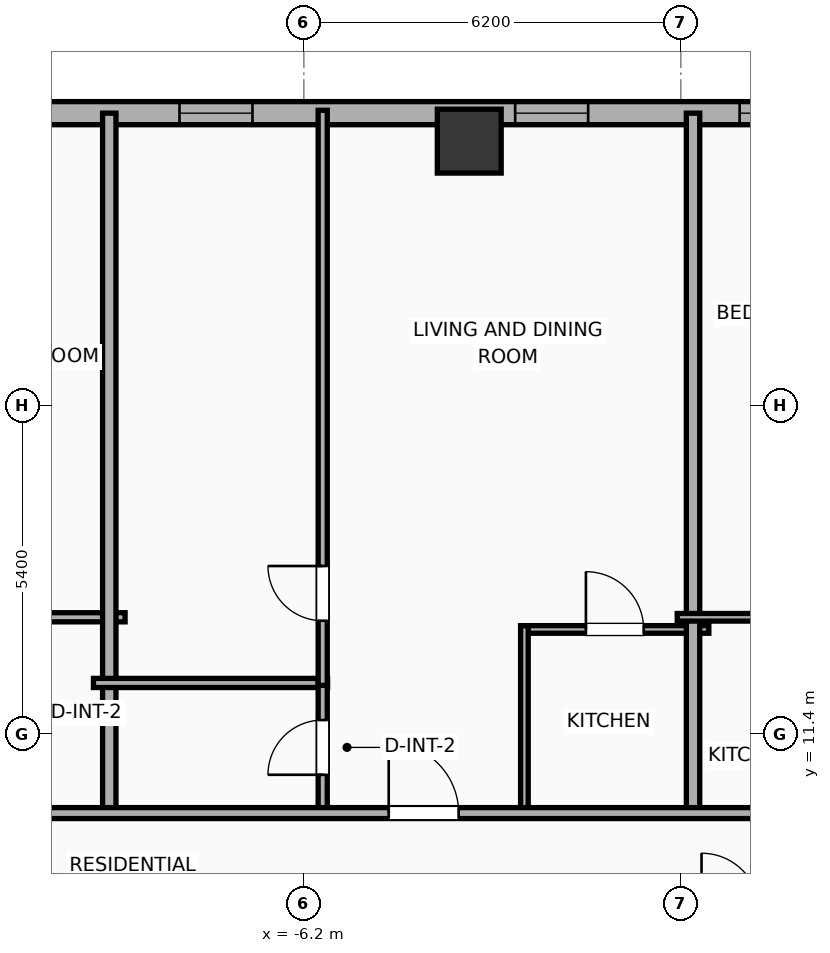
"""IFC4 building model, lengths in metres.
Left out: names, types, materials, properties, quantities, classifications, styles, units other than length and angle.
Written with IfcOpenShell. Run it as: python <this file> out.ifc"""

import sys

from ifc_helpers import new_model, si_unit, direction, frame, frame_2d, origin, origin_2d, place, context, subcontext, project, spatial, rectangle, hollow_rectangle, extrude, element, fill, save


model = new_model("IFC4")
c1 = context("Model", 3, precision=1e-05, world=origin(), true_north=direction((0.0, 1.0)))
c2 = subcontext(c1, "Body", "Model", "MODEL_VIEW")
j1 = project(units=[si_unit("LENGTHUNIT", "METRE"), si_unit("PLANEANGLEUNIT", "RADIAN")], contexts=[c1])
p1 = place(None, origin())
s1 = spatial("IfcSite", under=j1, at=p1, CompositionType="ELEMENT")
p2 = place(p1, origin())
s2 = spatial("IfcBuilding", under=s1, at=p2, CompositionType="ELEMENT")
p3 = place(p2, frame((0.0, 0.0, 97.5)))
s3 = spatial("IfcBuildingStorey", under=s2, at=p3, CompositionType="ELEMENT", Elevation=97.5)
p4 = place(p3, frame((-3.48, 21.15, 0.0), z_axis=(0.0, 0.0, 1.0), x_axis=(1.0, 0.0, 0.0)))
e1 = element("IfcColumn", 1, at=p4, inside=s3, PredefinedType="COLUMN", context=c2, shape_type="SweptSolid", body=[
    extrude(hollow_rectangle(XDim=1.05, YDim=1.05, WallThickness=0.036, at=origin_2d()), origin(), (0.0, 0.0, 1.0), 3.9),
])
p5 = place(p3, frame((-25.381, 21.61, 0.0), z_axis=(0.0, 0.0, 1.0), x_axis=(1.0, 0.0, 0.0)))
e2 = element("IfcWall", 2, at=p5, inside=s3, PredefinedType="ELEMENTEDWALL", context=c2, shape_type="SweptSolid", body=[
    extrude(rectangle(XDim=54.763, YDim=0.38, at=frame_2d((27.381, 0.0))), origin(), (0.0, 0.0, 1.0), 3.65),
])
p6 = place(p5, frame((45.067, 0.0, 0.75)))
e3 = element("IfcOpeningElement", 3, at=p6, cuts=e2, PredefinedType="OPENING", context=c2, shape_type="SweptSolid", body=[
    extrude(rectangle(XDim=2.4, YDim=2.1, at=frame_2d((1.2, 1.05))), frame((0.0, 0.2, 0.0), z_axis=(0.0, -1.0, 0.0), x_axis=(1.0, 0.0, 0.0)), (0.0, 0.0, 1.0), 0.4),
])
p7 = place(p5, frame((4.076, 0.0, 0.75)))
e4 = element("IfcOpeningElement", 4, at=p7, cuts=e2, PredefinedType="OPENING", context=c2, shape_type="SweptSolid", body=[
    extrude(rectangle(XDim=1.2, YDim=2.05, at=frame_2d((0.6, 1.025))), frame((0.0, 0.2, 0.0), z_axis=(0.0, -1.0, 0.0), x_axis=(1.0, 0.0, 0.0)), (0.0, 0.0, 1.0), 0.4),
])
p8 = place(p5, frame((9.395, 0.0, 0.75)))
e5 = element("IfcOpeningElement", 5, at=p8, cuts=e2, PredefinedType="OPENING", context=c2, shape_type="SweptSolid", body=[
    extrude(rectangle(XDim=0.85, YDim=2.05, at=frame_2d((0.425, 1.025))), frame((0.0, 0.2, 0.0), z_axis=(0.0, -1.0, 0.0), x_axis=(1.0, 0.0, 0.0)), (0.0, 0.0, 1.0), 0.4),
])
p9 = place(p5, frame((7.205, 0.0, 0.75)))
e6 = element("IfcOpeningElement", 6, at=p9, cuts=e2, PredefinedType="OPENING", context=c2, shape_type="SweptSolid", body=[
    extrude(rectangle(XDim=1.2, YDim=2.05, at=frame_2d((0.6, 1.025))), frame((0.0, 0.2, 0.0), z_axis=(0.0, -1.0, 0.0), x_axis=(1.0, 0.0, 0.0)), (0.0, 0.0, 1.0), 0.4),
])
p10 = place(p5, frame((13.676, 0.0, 0.75)))
e7 = element("IfcOpeningElement", 7, at=p10, cuts=e2, PredefinedType="OPENING", context=c2, shape_type="SweptSolid", body=[
    extrude(rectangle(XDim=1.2, YDim=2.05, at=frame_2d((0.6, 1.025))), frame((0.0, 0.2, 0.0), z_axis=(0.0, -1.0, 0.0), x_axis=(1.0, 0.0, 0.0)), (0.0, 0.0, 1.0), 0.4),
])
p11 = place(p5, frame((17.136, 0.0, 0.75)))
e8 = element("IfcOpeningElement", 8, at=p11, cuts=e2, PredefinedType="OPENING", context=c2, shape_type="SweptSolid", body=[
    extrude(rectangle(XDim=1.2, YDim=2.05, at=frame_2d((0.6, 1.025))), frame((0.0, 0.2, 0.0), z_axis=(0.0, -1.0, 0.0), x_axis=(1.0, 0.0, 0.0)), (0.0, 0.0, 1.0), 0.4),
])
p12 = place(p5, frame((22.656, 0.0, 0.75)))
e9 = element("IfcOpeningElement", 9, at=p12, cuts=e2, PredefinedType="OPENING", context=c2, shape_type="SweptSolid", body=[
    extrude(rectangle(XDim=1.2, YDim=2.05, at=frame_2d((0.6, 1.025))), frame((0.0, 0.2, 0.0), z_axis=(0.0, -1.0, 0.0), x_axis=(1.0, 0.0, 0.0)), (0.0, 0.0, 1.0), 0.4),
])
p13 = place(p5, frame((29.443, 0.0, 0.75)))
e10 = element("IfcOpeningElement", 10, at=p13, cuts=e2, PredefinedType="OPENING", context=c2, shape_type="SweptSolid", body=[
    extrude(rectangle(XDim=1.2, YDim=2.05, at=frame_2d((0.6, 1.025))), frame((0.0, 0.2, 0.0), z_axis=(0.0, -1.0, 0.0), x_axis=(1.0, 0.0, 0.0)), (0.0, 0.0, 1.0), 0.4),
])
p14 = place(p5, frame((26.348, 0.0, 0.75)))
e11 = element("IfcOpeningElement", 11, at=p14, cuts=e2, PredefinedType="OPENING", context=c2, shape_type="SweptSolid", body=[
    extrude(rectangle(XDim=1.2, YDim=2.05, at=frame_2d((0.6, 1.025))), frame((0.0, 0.2, 0.0), z_axis=(0.0, -1.0, 0.0), x_axis=(1.0, 0.0, 0.0)), (0.0, 0.0, 1.0), 0.4),
])
p15 = place(p5, frame((33.596, 0.0, 0.75)))
e12 = element("IfcOpeningElement", 12, at=p15, cuts=e2, PredefinedType="OPENING", context=c2, shape_type="SweptSolid", body=[
    extrude(rectangle(XDim=1.2, YDim=2.05, at=frame_2d((0.6, 1.025))), frame((0.0, 0.2, 0.0), z_axis=(0.0, -1.0, 0.0), x_axis=(1.0, 0.0, 0.0)), (0.0, 0.0, 1.0), 0.4),
])
p16 = place(p5, frame((36.014, 0.0, 0.75)))
e13 = element("IfcOpeningElement", 13, at=p16, cuts=e2, PredefinedType="OPENING", context=c2, shape_type="SweptSolid", body=[
    extrude(rectangle(XDim=1.2, YDim=2.05, at=frame_2d((0.6, 1.025))), frame((0.0, 0.2, 0.0), z_axis=(0.0, -1.0, 0.0), x_axis=(1.0, 0.0, 0.0)), (0.0, 0.0, 1.0), 0.4),
])
p17 = place(p5, frame((40.814, 0.0, 0.75)))
e14 = element("IfcOpeningElement", 14, at=p17, cuts=e2, PredefinedType="OPENING", context=c2, shape_type="SweptSolid", body=[
    extrude(rectangle(XDim=1.2, YDim=2.05, at=frame_2d((0.6, 1.025))), frame((0.0, 0.2, 0.0), z_axis=(0.0, -1.0, 0.0), x_axis=(1.0, 0.0, 0.0)), (0.0, 0.0, 1.0), 0.4),
])
p18 = place(p5, frame((49.385, 0.0, 0.75)))
e15 = element("IfcOpeningElement", 15, at=p18, cuts=e2, PredefinedType="OPENING", context=c2, shape_type="SweptSolid", body=[
    extrude(rectangle(XDim=1.2, YDim=2.05, at=frame_2d((0.6, 1.025))), frame((0.0, 0.2, 0.0), z_axis=(0.0, -1.0, 0.0), x_axis=(1.0, 0.0, 0.0)), (0.0, 0.0, 1.0), 0.4),
])
p19 = place(p5, frame((52.181, 0.0, 0.75)))
e16 = element("IfcOpeningElement", 16, at=p19, cuts=e2, PredefinedType="OPENING", context=c2, shape_type="SweptSolid", body=[
    extrude(rectangle(XDim=1.2, YDim=2.05, at=frame_2d((0.6, 1.025))), frame((0.0, 0.2, 0.0), z_axis=(0.0, -1.0, 0.0), x_axis=(1.0, 0.0, 0.0)), (0.0, 0.0, 1.0), 0.4),
])
p20 = place(p3, frame((-12.93, 13.32, 0.0), z_axis=(0.0, 0.0, 1.0), x_axis=(1.0, 0.0, 0.0)))
e17 = element("IfcWall", 17, at=p20, inside=s3, PredefinedType="PLUMBINGWALL", context=c2, shape_type="SweptSolid", body=[
    extrude(rectangle(XDim=3.79, YDim=0.15, at=frame_2d((1.895, 0.0))), origin(), (0.0, 0.0, 1.0), 3.65),
])
p21 = place(p3, frame((-9.4, 10.02, 0.0), z_axis=(0.0, 0.0, 1.0), x_axis=(0.0, 1.0, 0.0)))
e18 = element("IfcWall", 18, at=p21, inside=s3, PredefinedType="PARTITIONING", context=c2, shape_type="SweptSolid", body=[
    extrude(rectangle(XDim=11.59, YDim=0.22, at=frame_2d((5.795, 0.0))), origin(), (0.0, 0.0, 1.0), 3.65),
])
p22 = place(p3, frame((-9.66, 12.24, 0.0), z_axis=(0.0, 0.0, 1.0), x_axis=(1.0, 0.0, 0.0)))
e19 = element("IfcWall", 19, at=p22, inside=s3, PredefinedType="PLUMBINGWALL", context=c2, shape_type="SweptSolid", body=[
    extrude(rectangle(XDim=3.85, YDim=0.15, at=frame_2d((1.925, 0.0))), origin(), (0.0, 0.0, 1.0), 3.65),
])
p23 = place(p3, frame((-5.89, 10.08, 0.0), z_axis=(0.0, 0.0, 1.0), x_axis=(0.0, 1.0, 0.0)))
e20 = element("IfcWall", 20, at=p23, inside=s3, PredefinedType="PLUMBINGWALL", context=c2, shape_type="SweptSolid", body=[
    extrude(rectangle(XDim=2.2, YDim=0.15, at=frame_2d((1.1, 0.0))), origin(), (0.0, 0.0, 1.0), 3.65),
])
p24 = place(p23, frame((0.65, 0.0, 0.0)))
e21 = element("IfcOpeningElement", 21, at=p24, cuts=e20, PredefinedType="OPENING", context=c2, shape_type="SweptSolid", body=[
    extrude(rectangle(XDim=0.9, YDim=2.05, at=frame_2d((0.45, 1.025))), frame((0.0, 0.085, 0.0), z_axis=(0.0, -1.0, 0.0), x_axis=(1.0, 0.0, 0.0)), (0.0, 0.0, 1.0), 0.17),
])
p25 = place(p3, frame((-5.89, 12.2, 0.0), z_axis=(0.0, 0.0, 1.0), x_axis=(0.0, 1.0, 0.0)))
e22 = element("IfcWall", 22, at=p25, inside=s3, PredefinedType="PLUMBINGWALL", context=c2, shape_type="SweptSolid", body=[
    extrude(rectangle(XDim=9.458, YDim=0.15, at=frame_2d((4.729, 0.0))), origin(), (0.0, 0.0, 1.0), 3.65),
])
p26 = place(p25, frame((1.063, 0.0, 0.0)))
e23 = element("IfcOpeningElement", 23, at=p26, cuts=e22, PredefinedType="OPENING", context=c2, shape_type="SweptSolid", body=[
    extrude(rectangle(XDim=0.9, YDim=2.05, at=frame_2d((0.45, 1.025))), frame((0.0, 0.085, 0.0), z_axis=(0.0, -1.0, 0.0), x_axis=(1.0, 0.0, 0.0)), (0.0, 0.0, 1.0), 0.17),
])
p27 = place(p3, frame((-2.633, 13.12, 0.0), z_axis=(0.0, 0.0, 1.0), x_axis=(1.0, 0.0, 0.0)))
e24 = element("IfcWall", 24, at=p27, inside=s3, PredefinedType="PARTITIONING", context=c2, shape_type="SweptSolid", body=[
    extrude(rectangle(XDim=3.093, YDim=0.125, at=frame_2d((1.546, 0.0))), origin(), (0.0, 0.0, 1.0), 3.65),
])
p28 = place(p27, frame((1.072, 0.0, 0.0)))
e25 = element("IfcOpeningElement", 25, at=p28, cuts=e24, PredefinedType="OPENING", context=c2, shape_type="SweptSolid", body=[
    extrude(rectangle(XDim=0.95, YDim=2.05, at=frame_2d((0.475, 1.025))), frame((0.0, 0.073, 0.0), z_axis=(0.0, -1.0, 0.0), x_axis=(1.0, 0.0, 0.0)), (0.0, 0.0, 1.0), 0.145),
])
p29 = place(p3, frame((-2.573, 10.08, 0.0), z_axis=(0.0, 0.0, 1.0), x_axis=(0.0, 1.0, 0.0)))
e26 = element("IfcWall", 26, at=p29, inside=s3, PredefinedType="PARTITIONING", context=c2, shape_type="SweptSolid", body=[
    extrude(rectangle(XDim=3.1, YDim=0.125, at=frame_2d((1.55, 0.0))), origin(), (0.0, 0.0, 1.0), 3.65),
])
p30 = place(p3, frame((0.2, 10.02, 0.0), z_axis=(0.0, 0.0, 1.0), x_axis=(0.0, 1.0, 0.0)))
e27 = element("IfcWall", 27, at=p30, inside=s3, PredefinedType="PARTITIONING", context=c2, shape_type="SweptSolid", body=[
    extrude(rectangle(XDim=11.59, YDim=0.22, at=frame_2d((5.795, 0.0))), origin(), (0.0, 0.0, 1.0), 3.65),
])
p31 = place(p3, frame((-0.06, 13.32, 0.0), z_axis=(0.0, 0.0, 1.0), x_axis=(1.0, 0.0, 0.0)))
e28 = element("IfcWall", 28, at=p31, inside=s3, PredefinedType="PARTITIONING", context=c2, shape_type="SweptSolid", body=[
    extrude(rectangle(XDim=3.113, YDim=0.125, at=frame_2d((1.557, 0.0))), origin(), (0.0, 0.0, 1.0), 3.65),
])
p32 = place(p3, frame((-29.21, 10.1, 0.0), z_axis=(0.0, 0.0, 1.0), x_axis=(1.0, 0.0, 0.0)))
e29 = element("IfcWall", 29, at=p32, inside=s3, PredefinedType="PARTITIONING", context=c2, shape_type="SweptSolid", body=[
    extrude(rectangle(XDim=62.42, YDim=0.18, at=frame_2d((31.21, 0.0))), origin(), (0.0, 0.0, 1.0), 3.65),
])
p33 = place(p32, frame((4.906, 0.0, 0.0)))
e30 = element("IfcOpeningElement", 30, at=p33, cuts=e29, PredefinedType="OPENING", context=c2, shape_type="SweptSolid", body=[
    extrude(rectangle(XDim=1.15, YDim=2.05, at=frame_2d((0.575, 1.025))), frame((0.0, 0.1, 0.0), z_axis=(0.0, -1.0, 0.0), x_axis=(1.0, 0.0, 0.0)), (0.0, 0.0, 1.0), 0.2),
])
p34 = place(p32, frame((14.812, 0.0, 0.0)))
e31 = element("IfcOpeningElement", 31, at=p34, cuts=e29, PredefinedType="OPENING", context=c2, shape_type="SweptSolid", body=[
    extrude(rectangle(XDim=1.15, YDim=2.05, at=frame_2d((0.575, 1.025))), frame((0.0, 0.1, 0.0), z_axis=(0.0, -1.0, 0.0), x_axis=(1.0, 0.0, 0.0)), (0.0, 0.0, 1.0), 0.2),
])
p35 = place(p32, frame((24.406, 0.0, 0.0)))
e32 = element("IfcOpeningElement", 32, at=p35, cuts=e29, PredefinedType="OPENING", context=c2, shape_type="SweptSolid", body=[
    extrude(rectangle(XDim=1.15, YDim=2.05, at=frame_2d((0.575, 1.025))), frame((0.0, 0.1, 0.0), z_axis=(0.0, -1.0, 0.0), x_axis=(1.0, 0.0, 0.0)), (0.0, 0.0, 1.0), 0.2),
])
p36 = place(p32, frame((33.981, 0.0, 0.0)))
e33 = element("IfcOpeningElement", 33, at=p36, cuts=e29, PredefinedType="OPENING", context=c2, shape_type="SweptSolid", body=[
    extrude(rectangle(XDim=1.15, YDim=2.05, at=frame_2d((0.575, 1.025))), frame((0.0, 0.1, 0.0), z_axis=(0.0, -1.0, 0.0), x_axis=(1.0, 0.0, 0.0)), (0.0, 0.0, 1.0), 0.2),
])
p37 = place(p32, frame((43.138, 0.0, 0.0)))
e34 = element("IfcOpeningElement", 34, at=p37, cuts=e29, PredefinedType="OPENING", context=c2, shape_type="SweptSolid", body=[
    extrude(rectangle(XDim=1.15, YDim=2.05, at=frame_2d((0.575, 1.025))), frame((0.0, 0.1, 0.0), z_axis=(0.0, -1.0, 0.0), x_axis=(1.0, 0.0, 0.0)), (0.0, 0.0, 1.0), 0.2),
])
p38 = place(p32, frame((51.777, 0.0, 0.0)))
e35 = element("IfcOpeningElement", 35, at=p38, cuts=e29, PredefinedType="OPENING", context=c2, shape_type="SweptSolid", body=[
    extrude(rectangle(XDim=0.9, YDim=2.05, at=frame_2d((0.45, 1.025))), frame((0.0, 0.1, 0.0), z_axis=(0.0, -1.0, 0.0), x_axis=(1.0, 0.0, 0.0)), (0.0, 0.0, 1.0), 0.2),
])
p39 = place(p32, frame((58.718, 0.0, 0.0)))
e36 = element("IfcOpeningElement", 36, at=p39, cuts=e29, PredefinedType="OPENING", context=c2, shape_type="SweptSolid", body=[
    extrude(rectangle(XDim=0.9, YDim=2.05, at=frame_2d((0.45, 1.025))), frame((0.0, 0.1, 0.0), z_axis=(0.0, -1.0, 0.0), x_axis=(1.0, 0.0, 0.0)), (0.0, 0.0, 1.0), 0.2),
])
p40 = place(p11, origin())
e37 = element("IfcWindow", 37, at=p40, inside=s3, PartitioningType="SINGLE_PANEL", PredefinedType="WINDOW", context=c2, shape_type="SweptSolid", body=[
    extrude(rectangle(XDim=1.2, YDim=2.05, at=frame_2d((0.6, 1.025))), frame((0.0, 0.03, 0.0), z_axis=(0.0, -1.0, 0.0), x_axis=(1.0, 0.0, 0.0)), (0.0, 0.0, 1.0), 0.06),
])
fill(e8, e37)
p41 = place(p12, origin())
e38 = element("IfcWindow", 38, at=p41, inside=s3, PartitioningType="SINGLE_PANEL", PredefinedType="WINDOW", context=c2, shape_type="SweptSolid", body=[
    extrude(rectangle(XDim=1.2, YDim=2.05, at=frame_2d((0.6, 1.025))), frame((0.0, 0.03, 0.0), z_axis=(0.0, -1.0, 0.0), x_axis=(1.0, 0.0, 0.0)), (0.0, 0.0, 1.0), 0.06),
])
fill(e9, e38)
p42 = place(p14, origin())
e39 = element("IfcWindow", 39, at=p42, inside=s3, PartitioningType="SINGLE_PANEL", PredefinedType="WINDOW", context=c2, shape_type="SweptSolid", body=[
    extrude(rectangle(XDim=1.2, YDim=2.05, at=frame_2d((0.6, 1.025))), frame((0.0, 0.03, 0.0), z_axis=(0.0, -1.0, 0.0), x_axis=(1.0, 0.0, 0.0)), (0.0, 0.0, 1.0), 0.06),
])
fill(e11, e39)
p43 = place(p24, origin())
e40 = element("IfcDoor", 40, at=p43, inside=s3, OperationType="SINGLE_SWING_LEFT", PredefinedType="DOOR", context=c2, shape_type="SweptSolid", body=[
    extrude(rectangle(XDim=0.9, YDim=2.05, at=frame_2d((0.45, 1.025))), frame((0.0, 0.025, 0.0), z_axis=(0.0, -1.0, 0.0), x_axis=(1.0, 0.0, 0.0)), (0.0, 0.0, 1.0), 0.05),
])
fill(e21, e40)
p44 = place(p26, origin())
e41 = element("IfcDoor", 41, at=p44, inside=s3, OperationType="SINGLE_SWING_RIGHT", PredefinedType="DOOR", context=c2, shape_type="SweptSolid", body=[
    extrude(rectangle(XDim=0.9, YDim=2.05, at=frame_2d((0.45, 1.025))), frame((0.0, 0.025, 0.0), z_axis=(0.0, -1.0, 0.0), x_axis=(1.0, 0.0, 0.0)), (0.0, 0.0, 1.0), 0.05),
])
fill(e23, e41)
p45 = place(p28, origin())
e42 = element("IfcDoor", 42, at=p45, inside=s3, OperationType="SINGLE_SWING_LEFT", PredefinedType="DOOR", context=c2, shape_type="SweptSolid", body=[
    extrude(rectangle(XDim=0.95, YDim=2.05, at=frame_2d((0.475, 1.025))), frame((0.0, 0.025, 0.0), z_axis=(0.0, -1.0, 0.0), x_axis=(1.0, 0.0, 0.0)), (0.0, 0.0, 1.0), 0.05),
])
fill(e25, e42)
p46 = place(p35, origin())
e43 = element("IfcDoor", 43, at=p46, inside=s3, OperationType="SINGLE_SWING_LEFT", PredefinedType="DOOR", context=c2, shape_type="SweptSolid", body=[
    extrude(rectangle(XDim=1.15, YDim=2.05, at=frame_2d((0.575, 1.025))), frame((0.0, 0.025, 0.0), z_axis=(0.0, -1.0, 0.0), x_axis=(1.0, 0.0, 0.0)), (0.0, 0.0, 1.0), 0.05),
])
fill(e32, e43)
save(model, sys.argv[1])
